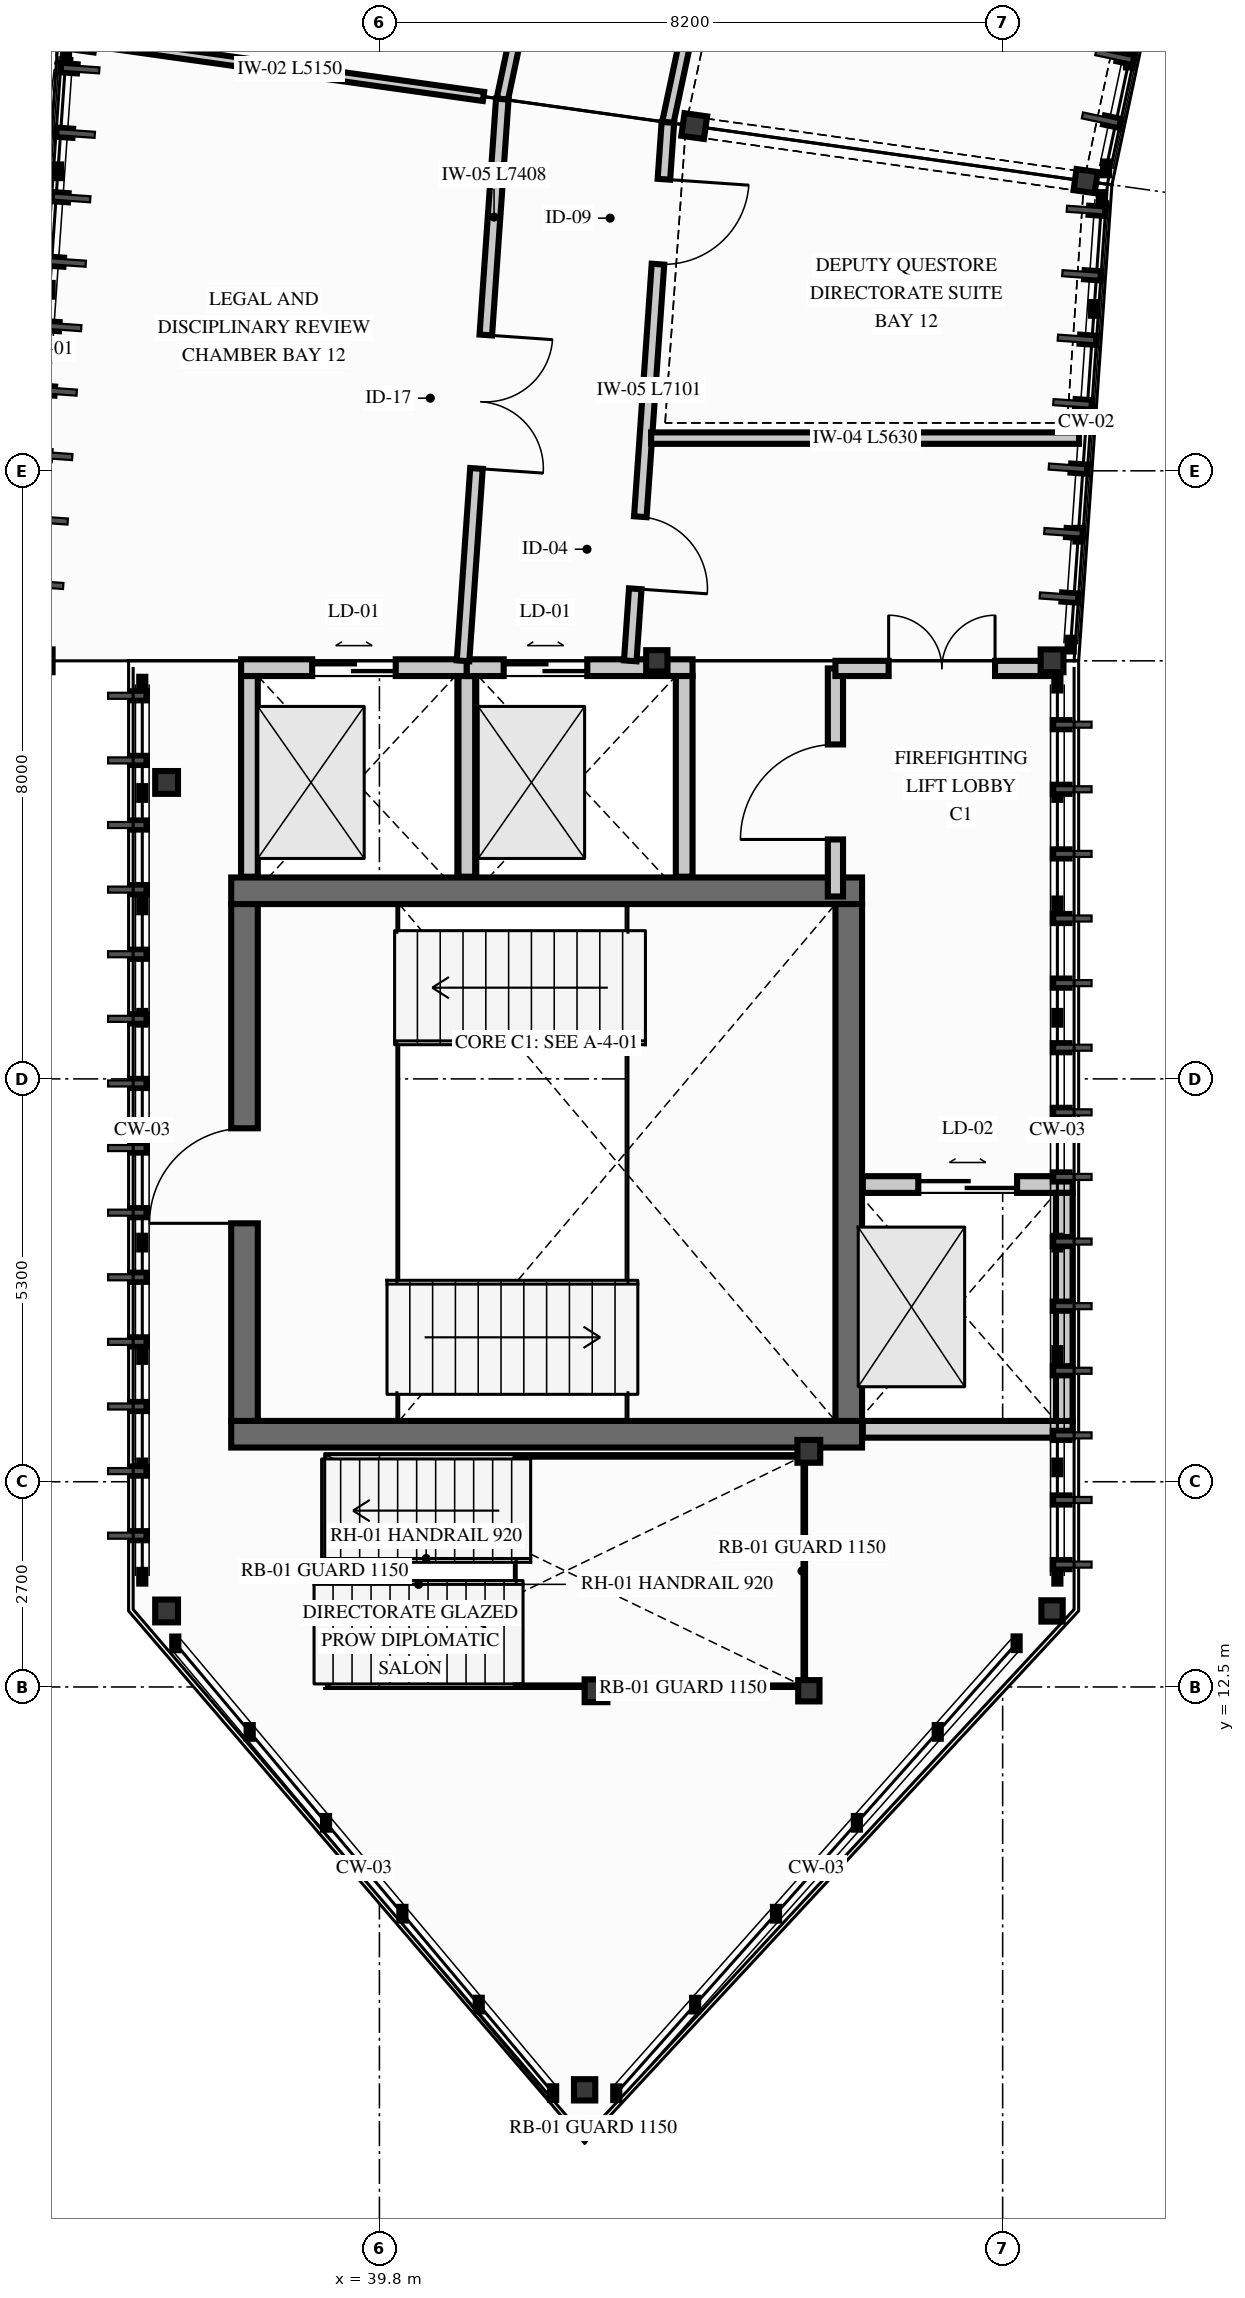
"""IFC4 building model, lengths in metres.
Left out: names, types, materials, properties, quantities, classifications, styles, units other than length and angle.
Written with IfcOpenShell. Run it as: python <this file> out.ifc"""

import sys

from ifc_helpers import new_model, si_unit, direction, frame, frame_2d, origin, origin_2d, place, context, subcontext, project, spatial, rectangle, i_section, extrude, element, fill, save


model = new_model("IFC4")
c1 = context("Model", 3, precision=1e-05, world=origin(), true_north=direction((0.0, 1.0)))
c2 = subcontext(c1, "Body", "Model", "MODEL_VIEW")
j1 = project(units=[si_unit("LENGTHUNIT", "METRE"), si_unit("PLANEANGLEUNIT", "RADIAN")], contexts=[c1])
p1 = place(None, origin())
s1 = spatial("IfcSite", under=j1, at=p1, CompositionType="ELEMENT")
p2 = place(p1, origin())
s2 = spatial("IfcBuilding", under=s1, at=p2, CompositionType="ELEMENT")
p3 = place(p2, frame((0.0, 0.0, 25.5)))
s3 = spatial("IfcBuildingStorey", under=s2, at=p3, CompositionType="ELEMENT", Elevation=25.5)
for number, where, z_axis, x_axis in (
    (1, (37.85, 15.825, 0.0), (0.0, 0.0, 1.0), (1.0, 0.0, 0.0)),
    (2, (37.85, 22.975, 0.0), (0.0, 0.0, 1.0), (1.0, 0.0, 0.0)),
):
    element("IfcWall", number, at=place(p3, frame(where, z_axis=z_axis, x_axis=x_axis)), inside=s3, PredefinedType="SHEAR", context=c2, shape_type="SweptSolid", body=[
        extrude(rectangle(XDim=8.3, YDim=0.35, at=frame_2d((4.15, 0.0))), origin(), (0.0, 0.0, 1.0), 3.7),
    ])
p4 = place(p3, frame((38.025, 16.0, 0.0), z_axis=(0.0, 0.0, 1.0), x_axis=(0.0, 1.0, 0.0)))
e3 = element("IfcWall", 3, at=p4, inside=s3, PredefinedType="SHEAR", context=c2, shape_type="SweptSolid", body=[
    extrude(rectangle(XDim=6.8, YDim=0.35, at=frame_2d((3.4, 0.0))), origin(), (0.0, 0.0, 1.0), 3.7),
])
p5 = place(p4, frame((2.6, 0.0, 0.0)))
e4 = element("IfcOpeningElement", 4, at=p5, cuts=e3, PredefinedType="OPENING", context=c2, shape_type="SweptSolid", body=[
    extrude(rectangle(XDim=1.25, YDim=2.2, at=frame_2d((0.625, 1.1))), frame((0.0, 0.185, 0.0), z_axis=(0.0, -1.0, 0.0), x_axis=(1.0, 0.0, 0.0)), (0.0, 0.0, 1.0), 0.37),
])
p6 = place(p3, frame((45.975, 16.0, 0.0), z_axis=(0.0, 0.0, 1.0), x_axis=(0.0, 1.0, 0.0)))
e5 = element("IfcWall", 5, at=p6, inside=s3, PredefinedType="SHEAR", context=c2, shape_type="SweptSolid", body=[
    extrude(rectangle(XDim=6.8, YDim=0.35, at=frame_2d((3.4, 0.0))), origin(), (0.0, 0.0, 1.0), 3.7),
])
p7 = place(p3, frame((49.091, 32.312, 0.0), z_axis=(0.0, 0.0, 1.0), x_axis=(0.13917310096, 0.990268068742, 0.0)))
e6 = element("IfcColumn", 6, at=p7, inside=s3, PredefinedType="COLUMN", context=c2, shape_type="SweptSolid", body=[
    extrude(i_section(OverallWidth=0.28, OverallDepth=0.28, WebThickness=0.01, FlangeThickness=0.018, FilletRadius=0.024, at=origin_2d()), origin(), (0.0, 0.0, 1.0), 3.9),
])
for number, where, z_axis, x_axis in (
    (7, (43.942, 33.035, 0.0), (0.0, 0.0, 1.0), (0.139, 0.99, 0.0)),
    (8, (48.65, 26.0, 0.0), (0.0, 0.0, 1.0), (0.0, 1.0, 0.0)),
):
    element("IfcColumn", number, at=place(p3, frame(where, z_axis=z_axis, x_axis=x_axis)), inside=s3, PredefinedType="COLUMN", context=c2, shape_type="SweptSolid", body=[
        extrude(i_section(OverallWidth=0.3, OverallDepth=0.3, WebThickness=0.011, FlangeThickness=0.019, FilletRadius=0.027, at=origin_2d()), origin(), (0.0, 0.0, 1.0), 3.9),
    ])
p8 = place(p3, frame((43.45, 26.0, 0.0), z_axis=(0.0, 0.0, 1.0), x_axis=(0.0, 1.0, 0.0)))
e9 = element("IfcColumn", 9, at=p8, inside=s3, PredefinedType="COLUMN", context=c2, shape_type="SweptSolid", body=[
    extrude(i_section(OverallWidth=0.28, OverallDepth=0.28, WebThickness=0.01, FlangeThickness=0.018, FilletRadius=0.024, at=origin_2d()), origin(), (0.0, 0.0, 1.0), 3.9),
])
for number, where, z_axis, x_axis in (
    (10, (35.35, 26.0, 0.0), (0.0, 0.0, 1.0), (0.0, 1.0, 0.0)),
    (11, (37.0, 24.4, 0.0), (0.0, 0.0, 1.0), (1.0, 0.0, 0.0)),
):
    element("IfcColumn", number, at=place(p3, frame(where, z_axis=z_axis, x_axis=x_axis)), inside=s3, PredefinedType="COLUMN", context=c2, shape_type="SweptSolid", body=[
        extrude(i_section(OverallWidth=0.3, OverallDepth=0.3, WebThickness=0.011, FlangeThickness=0.019, FilletRadius=0.027, at=origin_2d()), origin(), (0.0, 0.0, 1.0), 3.9),
    ])
p9 = place(p3, frame((48.65, 13.5, 0.0), z_axis=(0.0, 0.0, 1.0), x_axis=(1.0, 0.0, 0.0)))
e12 = element("IfcColumn", 12, at=p9, inside=s3, PredefinedType="COLUMN", context=c2, shape_type="SweptSolid", body=[
    extrude(i_section(OverallWidth=0.28, OverallDepth=0.28, WebThickness=0.01, FlangeThickness=0.018, FilletRadius=0.024, at=origin_2d()), origin(), (0.0, 0.0, 1.0), 3.9),
])
p10 = place(p3, frame((37.0, 13.5, 0.0), z_axis=(0.0, 0.0, 1.0), x_axis=(1.0, 0.0, 0.0)))
e13 = element("IfcColumn", 13, at=p10, inside=s3, PredefinedType="COLUMN", context=c2, shape_type="SweptSolid", body=[
    extrude(i_section(OverallWidth=0.3, OverallDepth=0.3, WebThickness=0.011, FlangeThickness=0.019, FilletRadius=0.027, at=origin_2d()), origin(), (0.0, 0.0, 1.0), 3.9),
])
p11 = place(p3, frame((42.5, 7.2, 0.0), z_axis=(0.0, 0.0, 1.0), x_axis=(1.0, 0.0, 0.0)))
e14 = element("IfcColumn", 14, at=p11, inside=s3, PredefinedType="COLUMN", context=c2, shape_type="SweptSolid", body=[
    extrude(i_section(OverallWidth=0.28, OverallDepth=0.28, WebThickness=0.01, FlangeThickness=0.018, FilletRadius=0.024, at=origin_2d()), origin(), (0.0, 0.0, 1.0), 3.9),
])
p12 = place(p3, frame((42.65, 12.45, 0.0), z_axis=(0.0, 0.0, 1.0), x_axis=(1.0, 0.0, 0.0)))
e15 = element("IfcColumn", 15, at=p12, inside=s3, PredefinedType="COLUMN", context=c2, shape_type="SweptSolid", body=[
    extrude(i_section(OverallWidth=0.3, OverallDepth=0.3, WebThickness=0.011, FlangeThickness=0.019, FilletRadius=0.027, at=origin_2d()), origin(), (0.0, 0.0, 1.0), 3.9),
])
p13 = place(p3, frame((45.45, 12.45, 0.0), z_axis=(0.0, 0.0, 1.0), x_axis=(1.0, 0.0, 0.0)))
e16 = element("IfcColumn", 16, at=p13, inside=s3, PredefinedType="COLUMN", context=c2, shape_type="SweptSolid", body=[
    extrude(i_section(OverallWidth=0.28, OverallDepth=0.28, WebThickness=0.01, FlangeThickness=0.018, FilletRadius=0.024, at=origin_2d()), origin(), (0.0, 0.0, 1.0), 3.9),
])
p14 = place(p3, frame((45.45, 15.6, 0.0), z_axis=(0.0, 0.0, 1.0), x_axis=(1.0, 0.0, 0.0)))
e17 = element("IfcColumn", 17, at=p14, inside=s3, PredefinedType="COLUMN", context=c2, shape_type="SweptSolid", body=[
    extrude(i_section(OverallWidth=0.3, OverallDepth=0.3, WebThickness=0.011, FlangeThickness=0.019, FilletRadius=0.027, at=origin_2d()), origin(), (0.0, 0.0, 1.0), 3.9),
])
p15 = place(p3, frame((46.16, 15.89, 0.0), z_axis=(0.0, 0.0, 1.0), x_axis=(1.0, 0.0, 0.0)))
e18 = element("IfcWall", 18, at=p15, inside=s3, PredefinedType="PARTITIONING", context=c2, shape_type="SweptSolid", body=[
    extrude(rectangle(XDim=2.76, YDim=0.22, at=frame_2d((1.38, 0.0))), origin(), (0.0, 0.0, 1.0), 3.338),
])
p16 = place(p3, frame((46.16, 19.11, 0.0), z_axis=(0.0, 0.0, 1.0), x_axis=(1.0, 0.0, 0.0)))
e19 = element("IfcWall", 19, at=p16, inside=s3, PredefinedType="PARTITIONING", context=c2, shape_type="SweptSolid", body=[
    extrude(rectangle(XDim=2.76, YDim=0.22, at=frame_2d((1.38, 0.0))), origin(), (0.0, 0.0, 1.0), 3.338),
])
p17 = place(p16, frame((0.73, 0.0, 0.0)))
e20 = element("IfcOpeningElement", 20, at=p17, cuts=e19, PredefinedType="OPENING", context=c2, shape_type="SweptSolid", body=[
    extrude(rectangle(XDim=1.3, YDim=2.2, at=frame_2d((0.65, 1.1))), frame((0.0, 0.12, 0.0), z_axis=(0.0, -1.0, 0.0), x_axis=(1.0, 0.0, 0.0)), (0.0, 0.0, 1.0), 0.24),
])
p18 = place(p3, frame((48.81, 16.0, 0.0), z_axis=(0.0, 0.0, 1.0), x_axis=(0.0, 1.0, 0.0)))
e21 = element("IfcWall", 21, at=p18, inside=s3, PredefinedType="PARTITIONING", context=c2, shape_type="SweptSolid", body=[
    extrude(rectangle(XDim=3.0, YDim=0.22, at=frame_2d((1.5, 0.0))), origin(), (0.0, 0.0, 1.0), 3.34),
])
p19 = place(p3, frame((37.98, 25.91, 0.0), z_axis=(0.0, 0.0, 1.0), x_axis=(1.0, 0.0, 0.0)))
e22 = element("IfcWall", 22, at=p19, inside=s3, PredefinedType="PARTITIONING", context=c2, shape_type="SweptSolid", body=[
    extrude(rectangle(XDim=2.97, YDim=0.22, at=frame_2d((1.485, 0.0))), origin(), (0.0, 0.0, 1.0), 3.25),
])
p20 = place(p19, frame((0.935, 0.0, 0.0)))
e23 = element("IfcOpeningElement", 23, at=p20, cuts=e22, PredefinedType="OPENING", context=c2, shape_type="SweptSolid", body=[
    extrude(rectangle(XDim=1.1, YDim=2.15, at=frame_2d((0.55, 1.075))), frame((0.0, 0.12, 0.0), z_axis=(0.0, -1.0, 0.0), x_axis=(1.0, 0.0, 0.0)), (0.0, 0.0, 1.0), 0.24),
])
for number, where, z_axis, x_axis in (
    (24, (38.09, 23.16, 0.0), (0.0, 0.0, 1.0), (0.0, 1.0, 0.0)),
    (25, (40.95, 23.16, 0.0), (0.0, 0.0, 1.0), (0.0, 1.0, 0.0)),
):
    element("IfcWall", number, at=place(p3, frame(where, z_axis=z_axis, x_axis=x_axis)), inside=s3, PredefinedType="PARTITIONING", context=c2, shape_type="SweptSolid", body=[
        extrude(rectangle(XDim=2.64, YDim=0.22, at=frame_2d((1.32, 0.0))), origin(), (0.0, 0.0, 1.0), 3.68),
    ])
p21 = place(p3, frame((40.95, 25.91, 0.0), z_axis=(0.0, 0.0, 1.0), x_axis=(1.0, 0.0, 0.0)))
e26 = element("IfcWall", 26, at=p21, inside=s3, PredefinedType="PARTITIONING", context=c2, shape_type="SweptSolid", body=[
    extrude(rectangle(XDim=2.97, YDim=0.22, at=frame_2d((1.485, 0.0))), origin(), (0.0, 0.0, 1.0), 3.25),
])
p22 = place(p21, frame((0.485, 0.0, 0.0)))
e27 = element("IfcOpeningElement", 27, at=p22, cuts=e26, PredefinedType="OPENING", context=c2, shape_type="SweptSolid", body=[
    extrude(rectangle(XDim=1.1, YDim=2.15, at=frame_2d((0.55, 1.075))), frame((0.0, 0.12, 0.0), z_axis=(0.0, -1.0, 0.0), x_axis=(1.0, 0.0, 0.0)), (0.0, 0.0, 1.0), 0.24),
])
p23 = place(p3, frame((43.81, 23.16, 0.0), z_axis=(0.0, 0.0, 1.0), x_axis=(0.0, 1.0, 0.0)))
e28 = element("IfcWall", 28, at=p23, inside=s3, PredefinedType="PARTITIONING", context=c2, shape_type="SweptSolid", body=[
    extrude(rectangle(XDim=2.64, YDim=0.22, at=frame_2d((1.32, 0.0))), origin(), (0.0, 0.0, 1.0), 3.68),
])
p24 = place(p3, frame((45.8, 22.9, 0.0), z_axis=(0.0, 0.0, 1.0), x_axis=(0.0, 1.0, 0.0)))
e29 = element("IfcWall", 29, at=p24, inside=s3, PredefinedType="PARTITIONING", context=c2, shape_type="SweptSolid", body=[
    extrude(rectangle(XDim=3.0, YDim=0.2, at=frame_2d((1.5, 0.0))), origin(), (0.0, 0.0, 1.0), 3.68),
])
p25 = place(p24, frame((0.75, 0.0, 0.0)))
e30 = element("IfcOpeningElement", 30, at=p25, cuts=e29, PredefinedType="OPENING", context=c2, shape_type="SweptSolid", body=[
    extrude(rectangle(XDim=1.25, YDim=2.2, at=frame_2d((0.625, 1.1))), frame((0.0, 0.11, 0.0), z_axis=(0.0, -1.0, 0.0), x_axis=(1.0, 0.0, 0.0)), (0.0, 0.0, 1.0), 0.22),
])
p26 = place(p3, frame((45.8, 25.9, 0.0), z_axis=(0.0, 0.0, 1.0), x_axis=(1.0, 0.0, 0.0)))
e31 = element("IfcWall", 31, at=p26, inside=s3, PredefinedType="PARTITIONING", context=c2, shape_type="SweptSolid", body=[
    extrude(rectangle(XDim=2.85, YDim=0.2, at=frame_2d((1.425, 0.0))), origin(), (0.0, 0.0, 1.0), 3.3),
])
p27 = place(p26, frame((0.7, 0.0, 0.0)))
e32 = element("IfcOpeningElement", 32, at=p27, cuts=e31, PredefinedType="OPENING", context=c2, shape_type="SweptSolid", body=[
    extrude(rectangle(XDim=1.4, YDim=2.25, at=frame_2d((0.7, 1.125))), frame((0.0, 0.11, 0.0), z_axis=(0.0, -1.0, 0.0), x_axis=(1.0, 0.0, 0.0)), (0.0, 0.0, 1.0), 0.22),
])
p28 = place(p3, frame((45.072, 40.03, 0.0), z_axis=(0.0, 0.0, 1.0), x_axis=(-0.207903987445, -0.978149238104, 0.0)))
e33 = element("IfcWall", 33, at=p28, inside=s3, PredefinedType="PARTITIONING", context=c2, shape_type="SweptSolid", body=[
    extrude(rectangle(XDim=7.101, YDim=0.15, at=frame_2d((3.551, 0.0))), origin(), (0.0, 0.0, 1.0), 3.68),
])
p29 = place(p28, frame((2.982, 0.0, 0.0)))
e34 = element("IfcOpeningElement", 34, at=p29, cuts=e33, PredefinedType="OPENING", context=c2, shape_type="SweptSolid", body=[
    extrude(rectangle(XDim=1.08, YDim=2.22, at=frame_2d((0.54, 1.11))), frame((0.0, 0.085, 0.0), z_axis=(0.0, -1.0, 0.0), x_axis=(1.0, 0.0, 0.0)), (0.0, 0.0, 1.0), 0.17),
])
p30 = place(p3, frame((42.957, 40.636, 0.0), z_axis=(0.0, 0.0, 1.0), x_axis=(-0.207921820376, -0.978145447575, 0.0)))
e35 = element("IfcWall", 35, at=p30, inside=s3, PredefinedType="PARTITIONING", context=c2, shape_type="SweptSolid", body=[
    extrude(rectangle(XDim=7.408, YDim=0.15, at=frame_2d((3.704, 0.0))), origin(), (0.0, 0.0, 1.0), 3.68),
])
p31 = place(p30, frame((3.111, 0.0, 0.0)))
e36 = element("IfcOpeningElement", 36, at=p31, cuts=e35, PredefinedType="OPENING", context=c2, shape_type="SweptSolid", body=[
    extrude(rectangle(XDim=0.9, YDim=2.1, at=frame_2d((0.45, 1.05))), frame((0.0, 0.085, 0.0), z_axis=(0.0, -1.0, 0.0), x_axis=(1.0, 0.0, 0.0)), (0.0, 0.0, 1.0), 0.17),
])
p32 = place(p3, frame((41.169, 33.425, 0.0), z_axis=(0.0, 0.0, 1.0), x_axis=(-0.990266484291, 0.13918437445, 0.0)))
e37 = element("IfcWall", 37, at=p32, inside=s3, PredefinedType="PARTITIONING", context=c2, shape_type="SweptSolid", body=[
    extrude(rectangle(XDim=5.15, YDim=0.12, at=frame_2d((2.575, 0.0))), origin(), (0.0, 0.0, 1.0), 3.25),
])
p33 = place(p3, frame((43.595, 33.084, 0.0), z_axis=(0.0, 0.0, 1.0), x_axis=(-0.069756597752, -0.997564041588, 0.0)))
e38 = element("IfcWall", 38, at=p33, inside=s3, PredefinedType="PARTITIONING", context=c2, shape_type="SweptSolid", body=[
    extrude(rectangle(XDim=7.101, YDim=0.165, at=frame_2d((3.551, 0.0))), origin(), (0.0, 0.0, 1.0), 3.68),
])
p34 = place(p33, frame((5.201, 0.0, 0.0)))
e39 = element("IfcOpeningElement", 39, at=p34, cuts=e38, PredefinedType="OPENING", context=c2, shape_type="SweptSolid", body=[
    extrude(rectangle(XDim=0.95, YDim=2.15, at=frame_2d((0.475, 1.075))), frame((0.0, 0.093, 0.0), z_axis=(0.0, -1.0, 0.0), x_axis=(1.0, 0.0, 0.0)), (0.0, 0.0, 1.0), 0.185),
])
p35 = place(p33, frame((0.75, 0.0, 0.0)))
e40 = element("IfcOpeningElement", 40, at=p35, cuts=e38, PredefinedType="OPENING", context=c2, shape_type="SweptSolid", body=[
    extrude(rectangle(XDim=1.12, YDim=2.2, at=frame_2d((0.56, 1.1))), frame((0.0, 0.093, 0.0), z_axis=(0.0, -1.0, 0.0), x_axis=(1.0, 0.0, 0.0)), (0.0, 0.0, 1.0), 0.185),
])
p36 = place(p3, frame((41.417, 33.39, 0.0), z_axis=(0.0, 0.0, 1.0), x_axis=(-0.069766817412, -0.997563326906, 0.0)))
e41 = element("IfcWall", 41, at=p36, inside=s3, PredefinedType="PARTITIONING", context=c2, shape_type="SweptSolid", body=[
    extrude(rectangle(XDim=7.408, YDim=0.165, at=frame_2d((3.704, 0.0))), origin(), (0.0, 0.0, 1.0), 3.68),
])
p37 = place(p36, frame((3.111, 0.0, 0.0)))
e42 = element("IfcOpeningElement", 42, at=p37, cuts=e41, PredefinedType="OPENING", context=c2, shape_type="SweptSolid", body=[
    extrude(rectangle(XDim=1.76, YDim=2.36, at=frame_2d((0.88, 1.18))), frame((0.0, 0.093, 0.0), z_axis=(0.0, -1.0, 0.0), x_axis=(1.0, 0.0, 0.0)), (0.0, 0.0, 1.0), 0.185),
])
p38 = place(p3, frame((43.375, 28.93, 0.0), z_axis=(0.0, 0.0, 1.0), x_axis=(1.0, 0.0, 0.0)))
e43 = element("IfcWall", 43, at=p38, inside=s3, PredefinedType="PARTITIONING", context=c2, shape_type="SweptSolid", body=[
    extrude(rectangle(XDim=5.63, YDim=0.15, at=frame_2d((2.815, 0.0))), origin(), (0.0, 0.0, 1.0), 3.398),
])
p39 = place(p5, origin())
e44 = element("IfcDoor", 44, at=p39, inside=s3, OperationType="SINGLE_SWING_LEFT", PredefinedType="DOOR", context=c2, shape_type="SweptSolid", body=[
    extrude(rectangle(XDim=1.25, YDim=2.2, at=frame_2d((0.625, 1.1))), frame((0.0, 0.025, 0.0), z_axis=(0.0, -1.0, 0.0), x_axis=(1.0, 0.0, 0.0)), (0.0, 0.0, 1.0), 0.05),
])
fill(e4, e44)
p40 = place(p17, origin())
e45 = element("IfcDoor", 45, at=p40, inside=s3, OperationType="DOUBLE_DOOR_SLIDING", PredefinedType="DOOR", context=c2, shape_type="SweptSolid", body=[
    extrude(rectangle(XDim=1.3, YDim=2.2, at=frame_2d((0.65, 1.1))), frame((0.0, 0.025, 0.0), z_axis=(0.0, -1.0, 0.0), x_axis=(1.0, 0.0, 0.0)), (0.0, 0.0, 1.0), 0.05),
])
fill(e20, e45)
p41 = place(p20, origin())
e46 = element("IfcDoor", 46, at=p41, inside=s3, OperationType="DOUBLE_DOOR_SLIDING", PredefinedType="DOOR", context=c2, shape_type="SweptSolid", body=[
    extrude(rectangle(XDim=1.1, YDim=2.15, at=frame_2d((0.55, 1.075))), frame((0.0, 0.025, 0.0), z_axis=(0.0, -1.0, 0.0), x_axis=(1.0, 0.0, 0.0)), (0.0, 0.0, 1.0), 0.05),
])
fill(e23, e46)
p42 = place(p22, origin())
e47 = element("IfcDoor", 47, at=p42, inside=s3, OperationType="DOUBLE_DOOR_SLIDING", PredefinedType="DOOR", context=c2, shape_type="SweptSolid", body=[
    extrude(rectangle(XDim=1.1, YDim=2.15, at=frame_2d((0.55, 1.075))), frame((0.0, 0.025, 0.0), z_axis=(0.0, -1.0, 0.0), x_axis=(1.0, 0.0, 0.0)), (0.0, 0.0, 1.0), 0.05),
])
fill(e27, e47)
p43 = place(p27, origin())
e48 = element("IfcDoor", 48, at=p43, inside=s3, OperationType="DOUBLE_DOOR_SINGLE_SWING", PredefinedType="DOOR", context=c2, shape_type="SweptSolid", body=[
    extrude(rectangle(XDim=1.4, YDim=2.25, at=frame_2d((0.7, 1.125))), frame((0.0, 0.025, 0.0), z_axis=(0.0, -1.0, 0.0), x_axis=(1.0, 0.0, 0.0)), (0.0, 0.0, 1.0), 0.05),
])
fill(e32, e48)
p44 = place(p25, origin())
e49 = element("IfcDoor", 49, at=p44, inside=s3, OperationType="SINGLE_SWING_LEFT", PredefinedType="DOOR", context=c2, shape_type="SweptSolid", body=[
    extrude(rectangle(XDim=1.25, YDim=2.2, at=frame_2d((0.625, 1.1))), frame((0.0, 0.025, 0.0), z_axis=(0.0, -1.0, 0.0), x_axis=(1.0, 0.0, 0.0)), (0.0, 0.0, 1.0), 0.05),
])
fill(e30, e49)
p45 = place(p34, origin())
e50 = element("IfcDoor", 50, at=p45, inside=s3, OperationType="SINGLE_SWING_RIGHT", PredefinedType="DOOR", context=c2, shape_type="SweptSolid", body=[
    extrude(rectangle(XDim=0.95, YDim=2.15, at=frame_2d((0.475, 1.075))), frame((0.0, 0.025, 0.0), z_axis=(0.0, -1.0, 0.0), x_axis=(1.0, 0.0, 0.0)), (0.0, 0.0, 1.0), 0.05),
])
fill(e39, e50)
p46 = place(p35, origin())
e51 = element("IfcDoor", 51, at=p46, inside=s3, OperationType="SINGLE_SWING_LEFT", PredefinedType="DOOR", context=c2, shape_type="SweptSolid", body=[
    extrude(rectangle(XDim=1.12, YDim=2.2, at=frame_2d((0.56, 1.1))), frame((0.0, 0.025, 0.0), z_axis=(0.0, -1.0, 0.0), x_axis=(1.0, 0.0, 0.0)), (0.0, 0.0, 1.0), 0.05),
])
fill(e40, e51)
p47 = place(p37, origin())
e52 = element("IfcDoor", 52, at=p47, inside=s3, OperationType="DOUBLE_DOOR_SINGLE_SWING", PredefinedType="DOOR", context=c2, shape_type="SweptSolid", body=[
    extrude(rectangle(XDim=1.76, YDim=2.36, at=frame_2d((0.88, 1.18))), frame((0.0, 0.025, 0.0), z_axis=(0.0, -1.0, 0.0), x_axis=(1.0, 0.0, 0.0)), (0.0, 0.0, 1.0), 0.05),
])
fill(e42, e52)
save(model, sys.argv[1])
